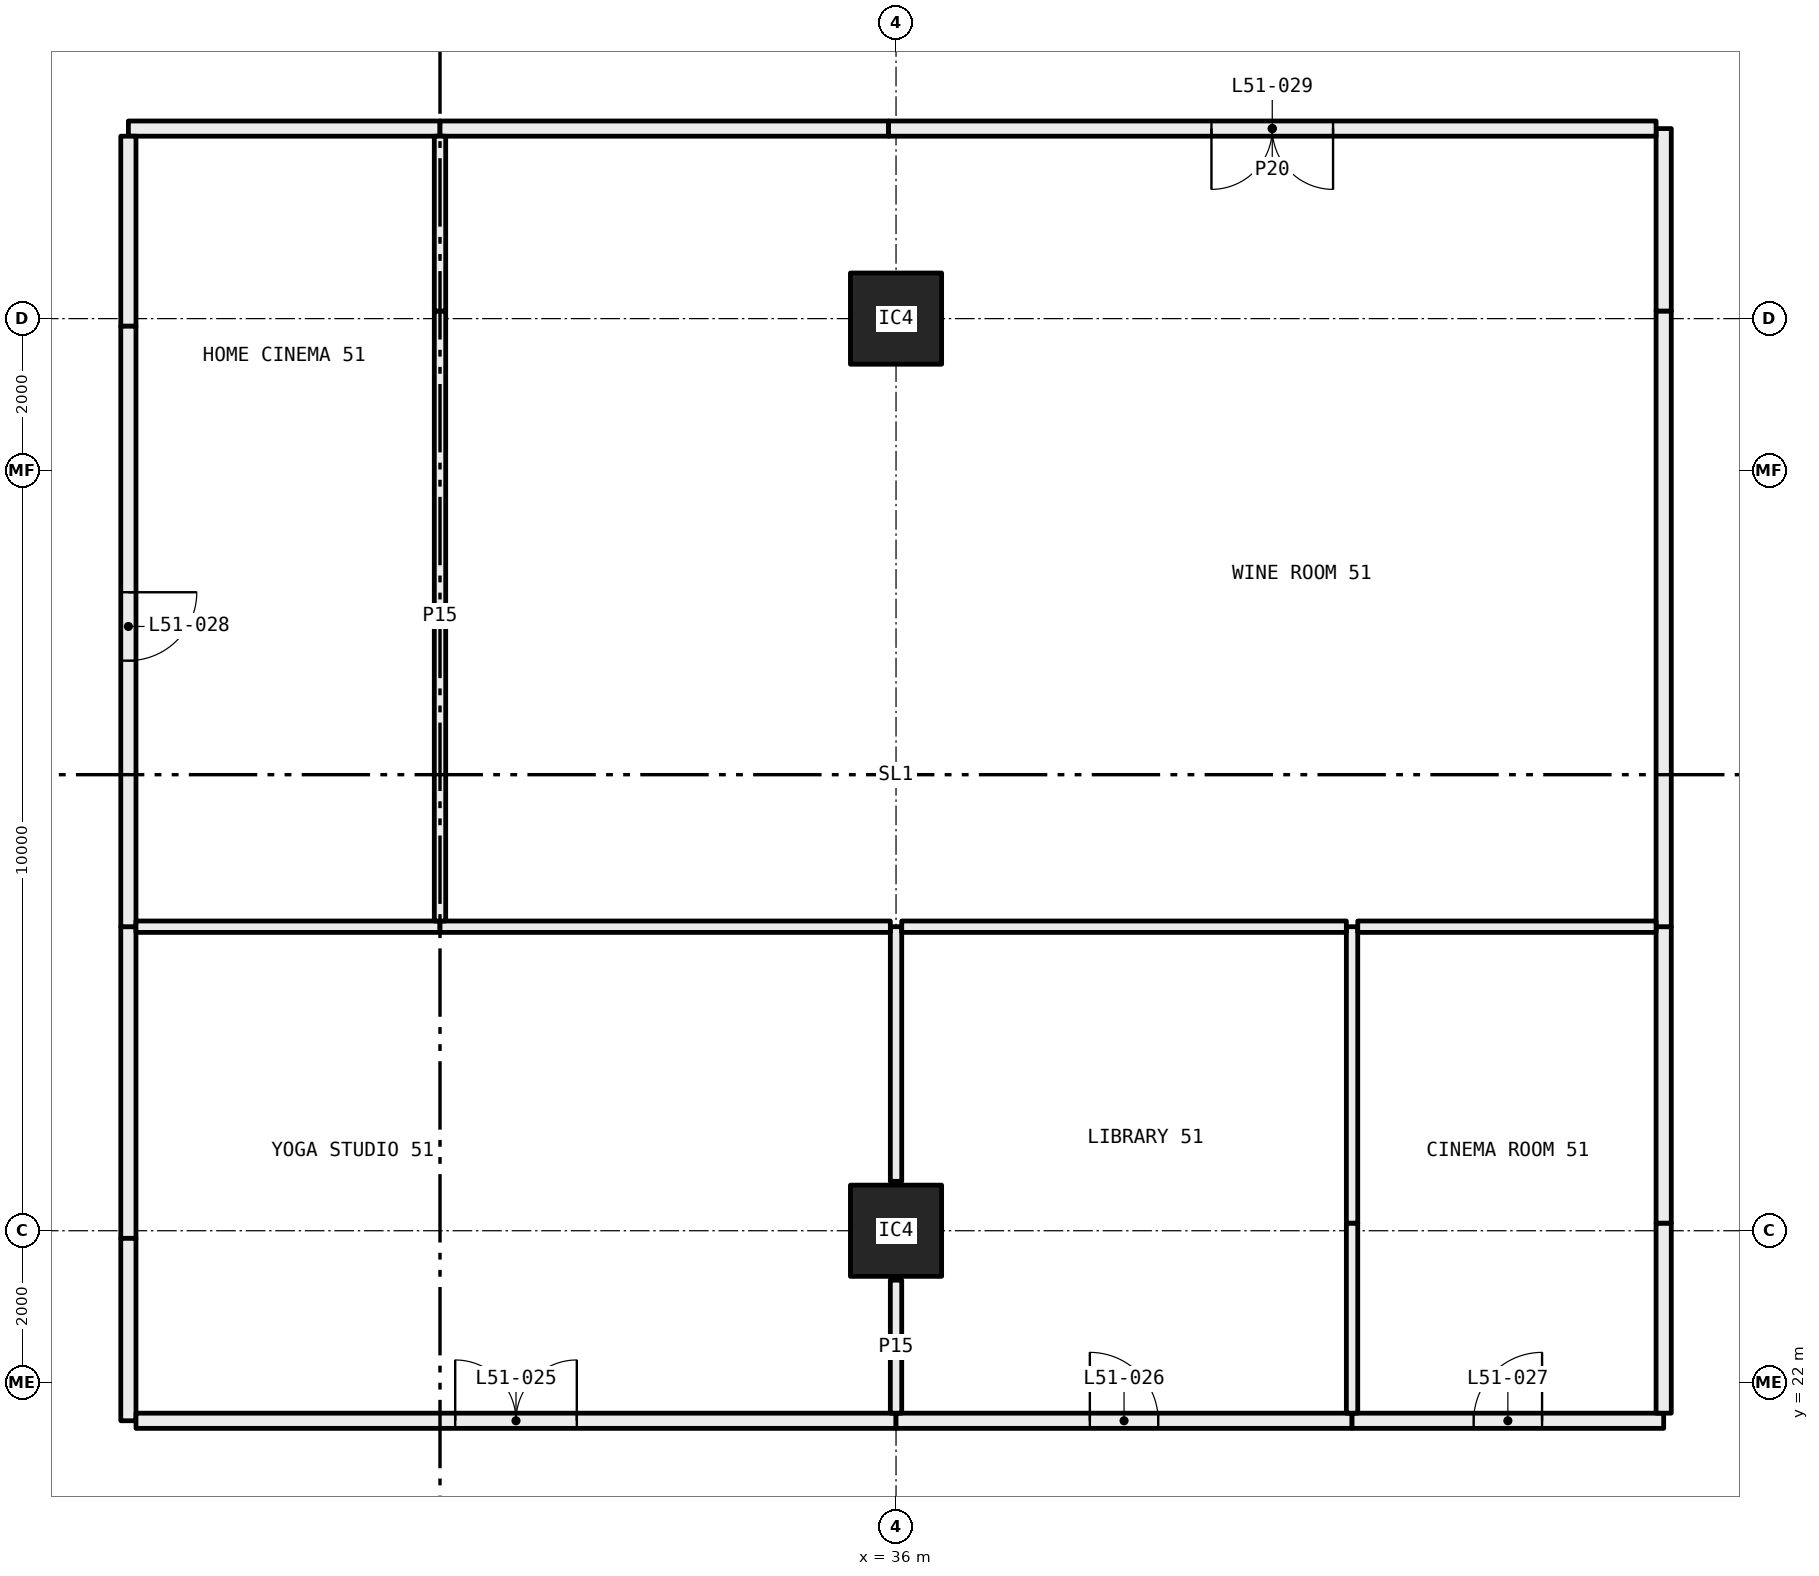
"""IFC4 building model, lengths in metres.
Left out: names, types, materials, properties, quantities, classifications, styles, units other than length and angle.
Written with IfcOpenShell. Run it as: python <this file> out.ifc"""

import sys

from ifc_helpers import new_model, si_unit, direction, frame, frame_2d, origin, origin_2d, place, context, subcontext, project, spatial, rectangle, hollow_rectangle, extrude, element, fill, save


model = new_model("IFC4")
c1 = context("Model", 3, precision=1e-05, world=origin(), true_north=direction((0.0, 1.0)))
c2 = subcontext(c1, "Body", "Model", "MODEL_VIEW")
j1 = project(units=[si_unit("LENGTHUNIT", "METRE"), si_unit("PLANEANGLEUNIT", "RADIAN")], contexts=[c1])
p1 = place(None, origin())
s1 = spatial("IfcSite", under=j1, at=p1, CompositionType="ELEMENT")
p2 = place(p1, origin())
s2 = spatial("IfcBuilding", under=s1, at=p2, CompositionType="ELEMENT")
p3 = place(p2, frame((0.0, 0.0, 192.75)))
s3 = spatial("IfcBuildingStorey", under=s2, at=p3, CompositionType="ELEMENT", Elevation=192.75)
for number, where, z_axis, x_axis in (
    (1, (36.0, 24.0, 0.0), (0.0, 0.0, 1.0), (1.0, 0.0, 0.0)),
    (2, (36.0, 36.0, 0.0), (0.0, 0.0, 1.0), (1.0, 0.0, 0.0)),
):
    element("IfcColumn", number, at=place(p3, frame(where, z_axis=z_axis, x_axis=x_axis)), inside=s3, PredefinedType="COLUMN", context=c2, shape_type="SweptSolid", body=[
        extrude(hollow_rectangle(XDim=1.2, YDim=1.2, WallThickness=0.05, at=origin_2d()), origin(), (0.0, 0.0, 1.0), 3.05),
    ])
p4 = place(p3, frame((25.9, 28.0, 0.0), z_axis=(0.0, 0.0, 1.0), x_axis=(0.0, -1.0, 0.0)))
e3 = element("IfcWall", 3, at=p4, inside=s3, PredefinedType="PARTITIONING", context=c2, shape_type="SweptSolid", body=[
    extrude(rectangle(XDim=4.1, YDim=0.2, at=frame_2d((2.05, 0.0))), origin(), (0.0, 0.0, 1.0), 2.45),
])
p5 = place(p3, frame((25.9, 23.9, 0.0), z_axis=(0.0, 0.0, 1.0), x_axis=(0.0, -1.0, 0.0)))
e4 = element("IfcWall", 4, at=p5, inside=s3, PredefinedType="PARTITIONING", context=c2, shape_type="SweptSolid", body=[
    extrude(rectangle(XDim=2.4, YDim=0.2, at=frame_2d((1.2, 0.0))), origin(), (0.0, 0.0, 1.0), 3.05),
])
p6 = place(p3, frame((26.0, 21.5, 0.0), z_axis=(0.0, 0.0, 1.0), x_axis=(1.0, 0.0, 0.0)))
e5 = element("IfcWall", 5, at=p6, inside=s3, PredefinedType="PARTITIONING", context=c2, shape_type="SweptSolid", body=[
    extrude(rectangle(XDim=10.0, YDim=0.2, at=frame_2d((5.0, 0.0))), origin(), (0.0, 0.0, 1.0), 2.45),
])
p7 = place(p6, frame((4.2, 0.0, 0.0)))
e6 = element("IfcOpeningElement", 6, at=p7, cuts=e5, PredefinedType="OPENING", context=c2, shape_type="SweptSolid", body=[
    extrude(rectangle(XDim=1.6, YDim=2.1, at=frame_2d((0.8, 1.05))), frame((0.0, 0.11, 0.0), z_axis=(0.0, -1.0, 0.0), x_axis=(1.0, 0.0, 0.0)), (0.0, 0.0, 1.0), 0.22),
])
p8 = place(p3, frame((36.0, 21.5, 0.0), z_axis=(0.0, 0.0, 1.0), x_axis=(1.0, 0.0, 0.0)))
e7 = element("IfcWall", 7, at=p8, inside=s3, PredefinedType="PARTITIONING", context=c2, shape_type="SweptSolid", body=[
    extrude(rectangle(XDim=6.0, YDim=0.2, at=frame_2d((3.0, 0.0))), origin(), (0.0, 0.0, 1.0), 2.45),
])
p9 = place(p8, frame((2.55, 0.0, 0.0)))
e8 = element("IfcOpeningElement", 8, at=p9, cuts=e7, PredefinedType="OPENING", context=c2, shape_type="SweptSolid", body=[
    extrude(rectangle(XDim=0.9, YDim=2.1, at=frame_2d((0.45, 1.05))), frame((0.0, 0.11, 0.0), z_axis=(0.0, -1.0, 0.0), x_axis=(1.0, 0.0, 0.0)), (0.0, 0.0, 1.0), 0.22),
])
p10 = place(p3, frame((42.0, 21.5, 0.0), z_axis=(0.0, 0.0, 1.0), x_axis=(1.0, 0.0, 0.0)))
e9 = element("IfcWall", 9, at=p10, inside=s3, PredefinedType="PARTITIONING", context=c2, shape_type="SweptSolid", body=[
    extrude(rectangle(XDim=4.1, YDim=0.2, at=frame_2d((2.05, 0.0))), origin(), (0.0, 0.0, 1.0), 3.05),
])
p11 = place(p10, frame((1.6, 0.0, 0.0)))
e10 = element("IfcOpeningElement", 10, at=p11, cuts=e9, PredefinedType="OPENING", context=c2, shape_type="SweptSolid", body=[
    extrude(rectangle(XDim=0.9, YDim=2.1, at=frame_2d((0.45, 1.05))), frame((0.0, 0.11, 0.0), z_axis=(0.0, -1.0, 0.0), x_axis=(1.0, 0.0, 0.0)), (0.0, 0.0, 1.0), 0.22),
])
p12 = place(p3, frame((46.1, 21.6, 0.0), z_axis=(0.0, 0.0, 1.0), x_axis=(0.0, 1.0, 0.0)))
e11 = element("IfcWall", 11, at=p12, inside=s3, PredefinedType="PARTITIONING", context=c2, shape_type="SweptSolid", body=[
    extrude(rectangle(XDim=2.5, YDim=0.2, at=frame_2d((1.25, 0.0))), origin(), (0.0, 0.0, 1.0), 2.45),
])
p13 = place(p3, frame((46.1, 24.1, 0.0), z_axis=(0.0, 0.0, 1.0), x_axis=(0.0, 1.0, 0.0)))
e12 = element("IfcWall", 12, at=p13, inside=s3, PredefinedType="PARTITIONING", context=c2, shape_type="SweptSolid", body=[
    extrude(rectangle(XDim=3.9, YDim=0.2, at=frame_2d((1.95, 0.0))), origin(), (0.0, 0.0, 1.0), 3.05),
])
p14 = place(p3, frame((30.0, 38.5, 0.0), z_axis=(0.0, 0.0, 1.0), x_axis=(-1.0, 0.0, 0.0)))
e13 = element("IfcWall", 13, at=p14, inside=s3, PredefinedType="PARTITIONING", context=c2, shape_type="SweptSolid", body=[
    extrude(rectangle(XDim=4.1, YDim=0.2, at=frame_2d((2.05, 0.0))), origin(), (0.0, 0.0, 1.0), 3.05),
])
p15 = place(p3, frame((25.9, 38.4, 0.0), z_axis=(0.0, 0.0, 1.0), x_axis=(0.0, -1.0, 0.0)))
e14 = element("IfcWall", 14, at=p15, inside=s3, PredefinedType="PARTITIONING", context=c2, shape_type="SweptSolid", body=[
    extrude(rectangle(XDim=2.5, YDim=0.2, at=frame_2d((1.25, 0.0))), origin(), (0.0, 0.0, 1.0), 2.45),
])
p16 = place(p3, frame((25.9, 35.9, 0.0), z_axis=(0.0, 0.0, 1.0), x_axis=(0.0, -1.0, 0.0)))
e15 = element("IfcWall", 15, at=p16, inside=s3, PredefinedType="PARTITIONING", context=c2, shape_type="SweptSolid", body=[
    extrude(rectangle(XDim=7.9, YDim=0.2, at=frame_2d((3.95, 0.0))), origin(), (0.0, 0.0, 1.0), 3.05),
])
p17 = place(p16, frame((3.5, 0.0, 0.0)))
e16 = element("IfcOpeningElement", 16, at=p17, cuts=e15, PredefinedType="OPENING", context=c2, shape_type="SweptSolid", body=[
    extrude(rectangle(XDim=0.9, YDim=2.1, at=frame_2d((0.45, 1.05))), frame((0.0, 0.11, 0.0), z_axis=(0.0, -1.0, 0.0), x_axis=(1.0, 0.0, 0.0)), (0.0, 0.0, 1.0), 0.22),
])
p18 = place(p3, frame((46.1, 28.0, 0.0), z_axis=(0.0, 0.0, 1.0), x_axis=(0.0, 1.0, 0.0)))
e17 = element("IfcWall", 17, at=p18, inside=s3, PredefinedType="PARTITIONING", context=c2, shape_type="SweptSolid", body=[
    extrude(rectangle(XDim=8.1, YDim=0.2, at=frame_2d((4.05, 0.0))), origin(), (0.0, 0.0, 1.0), 2.45),
])
p19 = place(p3, frame((46.1, 36.1, 0.0), z_axis=(0.0, 0.0, 1.0), x_axis=(0.0, 1.0, 0.0)))
e18 = element("IfcWall", 18, at=p19, inside=s3, PredefinedType="PARTITIONING", context=c2, shape_type="SweptSolid", body=[
    extrude(rectangle(XDim=2.4, YDim=0.2, at=frame_2d((1.2, 0.0))), origin(), (0.0, 0.0, 1.0), 3.05),
])
p20 = place(p3, frame((46.0, 38.5, 0.0), z_axis=(0.0, 0.0, 1.0), x_axis=(-1.0, 0.0, 0.0)))
e19 = element("IfcWall", 19, at=p20, inside=s3, PredefinedType="PARTITIONING", context=c2, shape_type="SweptSolid", body=[
    extrude(rectangle(XDim=10.1, YDim=0.2, at=frame_2d((5.05, 0.0))), origin(), (0.0, 0.0, 1.0), 2.45),
])
p21 = place(p20, frame((4.25, 0.0, 0.0)))
e20 = element("IfcOpeningElement", 20, at=p21, cuts=e19, PredefinedType="OPENING", context=c2, shape_type="SweptSolid", body=[
    extrude(rectangle(XDim=1.6, YDim=2.1, at=frame_2d((0.8, 1.05))), frame((0.0, 0.11, 0.0), z_axis=(0.0, -1.0, 0.0), x_axis=(1.0, 0.0, 0.0)), (0.0, 0.0, 1.0), 0.22),
])
p22 = place(p3, frame((35.9, 38.5, 0.0), z_axis=(0.0, 0.0, 1.0), x_axis=(-1.0, 0.0, 0.0)))
e21 = element("IfcWall", 21, at=p22, inside=s3, PredefinedType="PARTITIONING", context=c2, shape_type="SweptSolid", body=[
    extrude(rectangle(XDim=5.9, YDim=0.2, at=frame_2d((2.95, 0.0))), origin(), (0.0, 0.0, 1.0), 3.05),
])
p23 = place(p3, frame((36.0, 21.6, 0.0), z_axis=(0.0, 0.0, 1.0), x_axis=(0.0, 1.0, 0.0)))
e22 = element("IfcWall", 22, at=p23, inside=s3, PredefinedType="PARTITIONING", context=c2, shape_type="SweptSolid", body=[
    extrude(rectangle(XDim=1.75, YDim=0.15, at=frame_2d((0.875, 0.0))), origin(), (0.0, 0.0, 1.0), 2.45),
])
p24 = place(p3, frame((36.0, 24.65, 0.0), z_axis=(0.0, 0.0, 1.0), x_axis=(0.0, 1.0, 0.0)))
e23 = element("IfcWall", 23, at=p24, inside=s3, PredefinedType="PARTITIONING", context=c2, shape_type="SweptSolid", body=[
    extrude(rectangle(XDim=3.35, YDim=0.15, at=frame_2d((1.675, 0.0))), origin(), (0.0, 0.0, 1.0), 2.45),
])
p25 = place(p3, frame((30.0, 28.0, 0.0), z_axis=(0.0, 0.0, 1.0), x_axis=(-1.0, 0.0, 0.0)))
e24 = element("IfcWall", 24, at=p25, inside=s3, PredefinedType="PARTITIONING", context=c2, shape_type="SweptSolid", body=[
    extrude(rectangle(XDim=4.0, YDim=0.15, at=frame_2d((2.0, 0.0))), origin(), (0.0, 0.0, 1.0), 3.05),
])
p26 = place(p3, frame((35.925, 28.0, 0.0), z_axis=(0.0, 0.0, 1.0), x_axis=(-1.0, 0.0, 0.0)))
e25 = element("IfcWall", 25, at=p26, inside=s3, PredefinedType="PARTITIONING", context=c2, shape_type="SweptSolid", body=[
    extrude(rectangle(XDim=5.925, YDim=0.15, at=frame_2d((2.962, 0.0))), origin(), (0.0, 0.0, 1.0), 2.45),
])
p27 = place(p3, frame((42.0, 21.6, 0.0), z_axis=(0.0, 0.0, 1.0), x_axis=(0.0, 1.0, 0.0)))
e26 = element("IfcWall", 26, at=p27, inside=s3, PredefinedType="PARTITIONING", context=c2, shape_type="SweptSolid", body=[
    extrude(rectangle(XDim=2.5, YDim=0.15, at=frame_2d((1.25, 0.0))), origin(), (0.0, 0.0, 1.0), 2.45),
])
p28 = place(p3, frame((42.0, 24.1, 0.0), z_axis=(0.0, 0.0, 1.0), x_axis=(0.0, 1.0, 0.0)))
e27 = element("IfcWall", 27, at=p28, inside=s3, PredefinedType="PARTITIONING", context=c2, shape_type="SweptSolid", body=[
    extrude(rectangle(XDim=3.9, YDim=0.15, at=frame_2d((1.95, 0.0))), origin(), (0.0, 0.0, 1.0), 3.05),
])
p29 = place(p3, frame((41.925, 28.0, 0.0), z_axis=(0.0, 0.0, 1.0), x_axis=(-1.0, 0.0, 0.0)))
e28 = element("IfcWall", 28, at=p29, inside=s3, PredefinedType="PARTITIONING", context=c2, shape_type="SweptSolid", body=[
    extrude(rectangle(XDim=5.85, YDim=0.15, at=frame_2d((2.925, 0.0))), origin(), (0.0, 0.0, 1.0), 2.45),
])
p30 = place(p3, frame((46.0, 28.0, 0.0), z_axis=(0.0, 0.0, 1.0), x_axis=(-1.0, 0.0, 0.0)))
e29 = element("IfcWall", 29, at=p30, inside=s3, PredefinedType="PARTITIONING", context=c2, shape_type="SweptSolid", body=[
    extrude(rectangle(XDim=3.925, YDim=0.15, at=frame_2d((1.962, 0.0))), origin(), (0.0, 0.0, 1.0), 3.05),
])
p31 = place(p3, frame((30.0, 28.075, 0.0), z_axis=(0.0, 0.0, 1.0), x_axis=(0.0, 1.0, 0.0)))
e30 = element("IfcWall", 30, at=p31, inside=s3, PredefinedType="PARTITIONING", context=c2, shape_type="SweptSolid", body=[
    extrude(rectangle(XDim=8.025, YDim=0.15, at=frame_2d((4.013, 0.0))), origin(), (0.0, 0.0, 1.0), 2.45),
])
p32 = place(p3, frame((30.0, 36.1, 0.0), z_axis=(0.0, 0.0, 1.0), x_axis=(0.0, 1.0, 0.0)))
e31 = element("IfcWall", 31, at=p32, inside=s3, PredefinedType="PARTITIONING", context=c2, shape_type="SweptSolid", body=[
    extrude(rectangle(XDim=2.3, YDim=0.15, at=frame_2d((1.15, 0.0))), origin(), (0.0, 0.0, 1.0), 3.05),
])
p33 = place(p7, origin())
e32 = element("IfcDoor", 32, at=p33, inside=s3, OperationType="DOUBLE_DOOR_SINGLE_SWING", PredefinedType="DOOR", context=c2, shape_type="SweptSolid", body=[
    extrude(rectangle(XDim=1.6, YDim=2.1, at=frame_2d((0.8, 1.05))), frame((0.0, 0.025, 0.0), z_axis=(0.0, -1.0, 0.0), x_axis=(1.0, 0.0, 0.0)), (0.0, 0.0, 1.0), 0.05),
])
fill(e6, e32)
p34 = place(p9, origin())
e33 = element("IfcDoor", 33, at=p34, inside=s3, OperationType="SINGLE_SWING_RIGHT", PredefinedType="DOOR", context=c2, shape_type="SweptSolid", body=[
    extrude(rectangle(XDim=0.9, YDim=2.1, at=frame_2d((0.45, 1.05))), frame((0.0, 0.025, 0.0), z_axis=(0.0, -1.0, 0.0), x_axis=(1.0, 0.0, 0.0)), (0.0, 0.0, 1.0), 0.05),
])
fill(e8, e33)
p35 = place(p11, origin())
e34 = element("IfcDoor", 34, at=p35, inside=s3, OperationType="SINGLE_SWING_LEFT", PredefinedType="DOOR", context=c2, shape_type="SweptSolid", body=[
    extrude(rectangle(XDim=0.9, YDim=2.1, at=frame_2d((0.45, 1.05))), frame((0.0, 0.025, 0.0), z_axis=(0.0, -1.0, 0.0), x_axis=(1.0, 0.0, 0.0)), (0.0, 0.0, 1.0), 0.05),
])
fill(e10, e34)
p36 = place(p17, origin())
e35 = element("IfcDoor", 35, at=p36, inside=s3, OperationType="SINGLE_SWING_RIGHT", PredefinedType="DOOR", context=c2, shape_type="SweptSolid", body=[
    extrude(rectangle(XDim=0.9, YDim=2.1, at=frame_2d((0.45, 1.05))), frame((0.0, 0.025, 0.0), z_axis=(0.0, -1.0, 0.0), x_axis=(1.0, 0.0, 0.0)), (0.0, 0.0, 1.0), 0.05),
])
fill(e16, e35)
p37 = place(p21, origin())
e36 = element("IfcDoor", 36, at=p37, inside=s3, OperationType="DOUBLE_DOOR_SINGLE_SWING", PredefinedType="DOOR", context=c2, shape_type="SweptSolid", body=[
    extrude(rectangle(XDim=1.6, YDim=2.1, at=frame_2d((0.8, 1.05))), frame((0.0, 0.025, 0.0), z_axis=(0.0, -1.0, 0.0), x_axis=(1.0, 0.0, 0.0)), (0.0, 0.0, 1.0), 0.05),
])
fill(e20, e36)
save(model, sys.argv[1])
